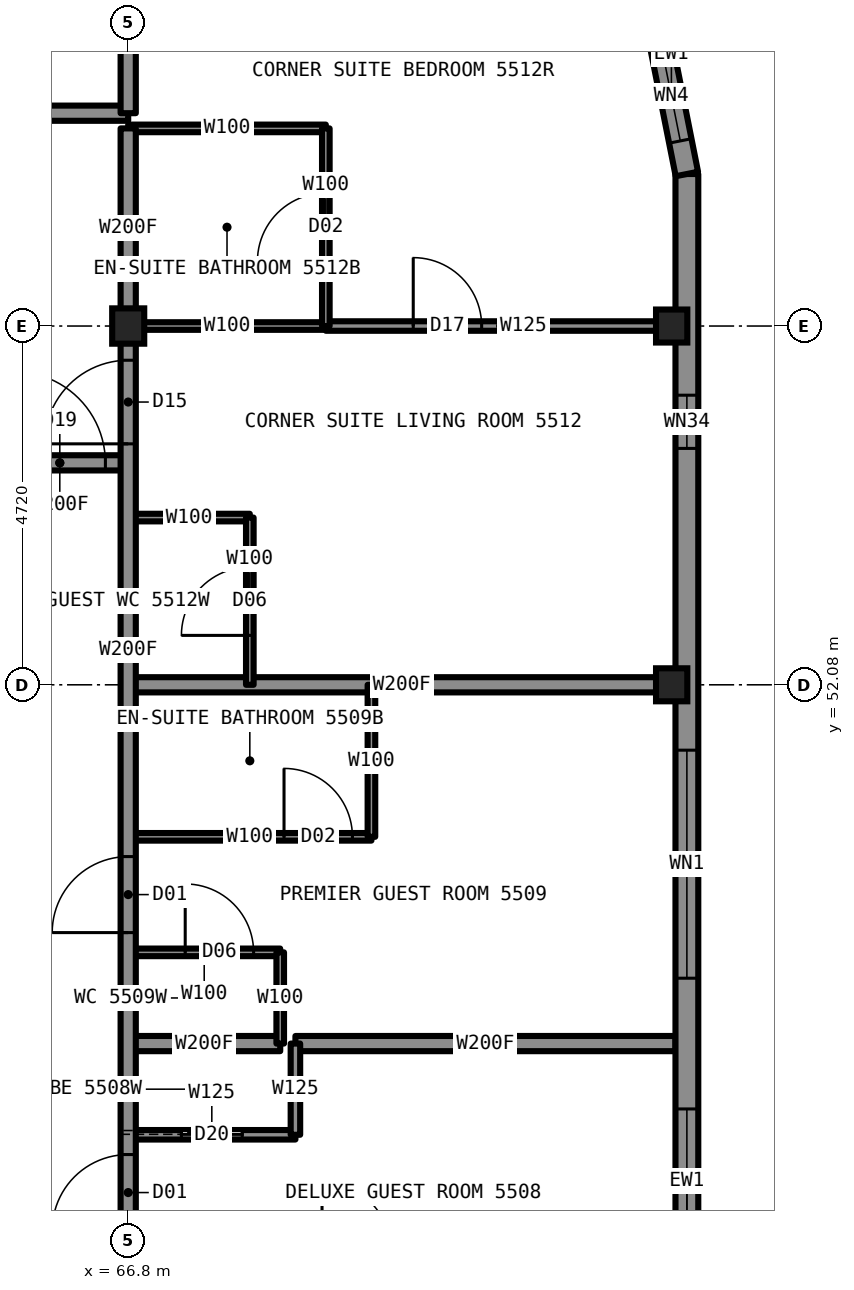
"""IFC4 building model, lengths in metres.
Left out: names, types, materials, properties, quantities, classifications, styles, units other than length and angle.
Written with IfcOpenShell. Run it as: python <this file> out.ifc"""

import sys

from ifc_helpers import new_model, si_unit, direction, frame, frame_2d, origin, origin_2d, place, context, subcontext, project, spatial, rectangle, i_section, extrude, element, fill, save


model = new_model("IFC4")
c1 = context("Model", 3, precision=1e-05, world=origin(), true_north=direction((0.0, 1.0)))
c2 = subcontext(c1, "Body", "Model", "MODEL_VIEW")
j1 = project(units=[si_unit("LENGTHUNIT", "METRE"), si_unit("PLANEANGLEUNIT", "RADIAN")], contexts=[c1])
p1 = place(None, origin())
s1 = spatial("IfcSite", under=j1, at=p1, CompositionType="ELEMENT")
p2 = place(p1, origin())
s2 = spatial("IfcBuilding", under=s1, at=p2, CompositionType="ELEMENT")
p3 = place(p2, frame((0.0, 0.0, 203.8)))
s3 = spatial("IfcBuildingStorey", under=s2, at=p3, CompositionType="ELEMENT", Elevation=203.8)
for number, where, z_axis, x_axis in (
    (1, (73.95, 52.08, 0.0), (0.0, 0.0, 1.0), (1.0, 0.0, 0.0)),
    (2, (73.95, 56.8, 0.0), (0.0, 0.0, 1.0), (1.0, 0.0, 0.0)),
):
    element("IfcColumn", number, at=place(p3, frame(where, z_axis=z_axis, x_axis=x_axis)), inside=s3, PredefinedType="COLUMN", context=c2, shape_type="SweptSolid", body=[
        extrude(i_section(OverallWidth=0.411, OverallDepth=0.434, WebThickness=0.036, FlangeThickness=0.057, at=origin_2d()), origin(), (0.0, 0.0, 1.0), 3.5),
    ])
p4 = place(p3, frame((66.8, 56.8, 0.0), z_axis=(0.0, 0.0, 1.0), x_axis=(1.0, 0.0, 0.0)))
e3 = element("IfcColumn", 3, at=p4, inside=s3, PredefinedType="COLUMN", context=c2, shape_type="SweptSolid", body=[
    extrude(i_section(OverallWidth=0.422, OverallDepth=0.465, WebThickness=0.045, FlangeThickness=0.073, at=origin_2d()), origin(), (0.0, 0.0, 1.0), 3.5),
])
p5 = place(p3, frame((66.8, 46.16, 0.0), z_axis=(0.0, 0.0, 1.0), x_axis=(1.0, 0.0, 0.0)))
e4 = element("IfcWall", 4, at=p5, inside=s3, PredefinedType="PARTITIONING", context=c2, shape_type="SweptSolid", body=[
    extrude(rectangle(XDim=2.2, YDim=0.125, at=frame_2d((1.1, 0.0))), origin(), (0.0, 0.0, 1.0), 3.33),
])
p6 = place(p5, frame((0.7, 0.0, 0.0)))
e5 = element("IfcOpeningElement", 5, at=p6, cuts=e4, PredefinedType="OPENING", context=c2, shape_type="SweptSolid", body=[
    extrude(rectangle(XDim=0.8, YDim=2.1, at=frame_2d((0.4, 1.05))), frame((0.0, 0.073, 0.0), z_axis=(0.0, -1.0, 0.0), x_axis=(1.0, 0.0, 0.0)), (0.0, 0.0, 1.0), 0.145),
])
p7 = place(p3, frame((65.0, 55.0, 0.0), z_axis=(0.0, 0.0, 1.0), x_axis=(1.0, 0.0, 0.0)))
e6 = element("IfcWall", 6, at=p7, inside=s3, PredefinedType="PARTITIONING", context=c2, shape_type="SweptSolid", body=[
    extrude(rectangle(XDim=1.8, YDim=0.2, at=frame_2d((0.9, 0.0))), origin(), (0.0, 0.0, 1.0), 3.33),
])
p8 = place(p7, frame((0.3, 0.0, 0.0)))
e7 = element("IfcOpeningElement", 7, at=p8, cuts=e6, PredefinedType="OPENING", context=c2, shape_type="SweptSolid", body=[
    extrude(rectangle(XDim=1.2, YDim=2.2, at=frame_2d((0.6, 1.1))), frame((0.0, 0.11, 0.0), z_axis=(0.0, -1.0, 0.0), x_axis=(1.0, 0.0, 0.0)), (0.0, 0.0, 1.0), 0.22),
])
p9 = place(p3, frame((66.8, 56.8, 0.0), z_axis=(0.0, 0.0, 1.0), x_axis=(1.0, 0.0, 0.0)))
e8 = element("IfcWall", 8, at=p9, inside=s3, PredefinedType="PARTITIONING", context=c2, shape_type="SweptSolid", body=[
    extrude(rectangle(XDim=2.6, YDim=0.1, at=frame_2d((1.3, 0.0))), origin(), (0.0, 0.0, 1.0), 2.573),
])
p10 = place(p3, frame((69.4, 56.8, 0.0), z_axis=(0.0, 0.0, 1.0), x_axis=(1.0, 0.0, 0.0)))
e9 = element("IfcWall", 9, at=p10, inside=s3, PredefinedType="PARTITIONING", context=c2, shape_type="SweptSolid", body=[
    extrude(rectangle(XDim=4.6, YDim=0.125, at=frame_2d((2.3, 0.0))), origin(), (0.0, 0.0, 1.0), 2.573),
])
p11 = place(p10, frame((1.15, 0.0, 0.0)))
e10 = element("IfcOpeningElement", 10, at=p11, cuts=e9, PredefinedType="OPENING", context=c2, shape_type="SweptSolid", body=[
    extrude(rectangle(XDim=0.9, YDim=2.2, at=frame_2d((0.45, 1.1))), frame((0.0, 0.073, 0.0), z_axis=(0.0, -1.0, 0.0), x_axis=(1.0, 0.0, 0.0)), (0.0, 0.0, 1.0), 0.145),
])
p12 = place(p3, frame((66.8, 59.4, 0.0), z_axis=(0.0, 0.0, 1.0), x_axis=(1.0, 0.0, 0.0)))
e11 = element("IfcWall", 11, at=p12, inside=s3, PredefinedType="PARTITIONING", context=c2, shape_type="SweptSolid", body=[
    extrude(rectangle(XDim=2.6, YDim=0.1, at=frame_2d((1.3, 0.0))), origin(), (0.0, 0.0, 1.0), 3.33),
])
p13 = place(p3, frame((43.2, 59.6, 0.0), z_axis=(0.0, 0.0, 1.0), x_axis=(1.0, 0.0, 0.0)))
e12 = element("IfcWall", 12, at=p13, inside=s3, PredefinedType="PARTITIONING", context=c2, shape_type="SweptSolid", body=[
    extrude(rectangle(XDim=23.6, YDim=0.2, at=frame_2d((11.8, 0.0))), origin(), (0.0, 0.0, 1.0), 3.33),
])
p14 = place(p13, frame((1.46, 0.0, 0.0)))
e13 = element("IfcOpeningElement", 13, at=p14, cuts=e12, PredefinedType="OPENING", context=c2, shape_type="SweptSolid", body=[
    extrude(rectangle(XDim=1.0, YDim=2.2, at=frame_2d((0.5, 1.1))), frame((0.0, 0.11, 0.0), z_axis=(0.0, -1.0, 0.0), x_axis=(1.0, 0.0, 0.0)), (0.0, 0.0, 1.0), 0.22),
])
p15 = place(p13, frame((6.18, 0.0, 0.0)))
e14 = element("IfcOpeningElement", 14, at=p15, cuts=e12, PredefinedType="OPENING", context=c2, shape_type="SweptSolid", body=[
    extrude(rectangle(XDim=1.0, YDim=2.2, at=frame_2d((0.5, 1.1))), frame((0.0, 0.11, 0.0), z_axis=(0.0, -1.0, 0.0), x_axis=(1.0, 0.0, 0.0)), (0.0, 0.0, 1.0), 0.22),
])
p16 = place(p13, frame((11.29, 0.0, 0.0)))
e15 = element("IfcOpeningElement", 15, at=p16, cuts=e12, PredefinedType="OPENING", context=c2, shape_type="SweptSolid", body=[
    extrude(rectangle(XDim=1.1, YDim=2.2, at=frame_2d((0.55, 1.1))), frame((0.0, 0.11, 0.0), z_axis=(0.0, -1.0, 0.0), x_axis=(1.0, 0.0, 0.0)), (0.0, 0.0, 1.0), 0.22),
])
p17 = place(p3, frame((66.8, 47.36, 0.0), z_axis=(0.0, 0.0, 1.0), x_axis=(1.0, 0.0, 0.0)))
e16 = element("IfcWall", 16, at=p17, inside=s3, PredefinedType="PARTITIONING", context=c2, shape_type="SweptSolid", body=[
    extrude(rectangle(XDim=2.0, YDim=0.2, at=frame_2d((1.0, 0.0))), origin(), (0.0, 0.0, 1.0), 2.73),
])
p18 = place(p3, frame((69.0, 47.36, 0.0), z_axis=(0.0, 0.0, 1.0), x_axis=(1.0, 0.0, 0.0)))
e17 = element("IfcWall", 17, at=p18, inside=s3, PredefinedType="PARTITIONING", context=c2, shape_type="SweptSolid", body=[
    extrude(rectangle(XDim=5.0, YDim=0.2, at=frame_2d((2.5, 0.0))), origin(), (0.0, 0.0, 1.0), 2.73),
])
p19 = place(p3, frame((66.8, 48.56, 0.0), z_axis=(0.0, 0.0, 1.0), x_axis=(1.0, 0.0, 0.0)))
e18 = element("IfcWall", 18, at=p19, inside=s3, PredefinedType="PARTITIONING", context=c2, shape_type="SweptSolid", body=[
    extrude(rectangle(XDim=2.0, YDim=0.1, at=frame_2d((1.0, 0.0))), origin(), (0.0, 0.0, 1.0), 3.33),
])
p20 = place(p19, frame((0.75, 0.0, 0.0)))
e19 = element("IfcOpeningElement", 19, at=p20, cuts=e18, PredefinedType="OPENING", context=c2, shape_type="SweptSolid", body=[
    extrude(rectangle(XDim=0.9, YDim=2.1, at=frame_2d((0.45, 1.05))), frame((0.0, 0.06, 0.0), z_axis=(0.0, -1.0, 0.0), x_axis=(1.0, 0.0, 0.0)), (0.0, 0.0, 1.0), 0.12),
])
p21 = place(p3, frame((66.8, 50.08, 0.0), z_axis=(0.0, 0.0, 1.0), x_axis=(1.0, 0.0, 0.0)))
e20 = element("IfcWall", 20, at=p21, inside=s3, PredefinedType="PARTITIONING", context=c2, shape_type="SweptSolid", body=[
    extrude(rectangle(XDim=3.2, YDim=0.1, at=frame_2d((1.6, 0.0))), origin(), (0.0, 0.0, 1.0), 3.33),
])
p22 = place(p21, frame((2.05, 0.0, 0.0)))
e21 = element("IfcOpeningElement", 21, at=p22, cuts=e20, PredefinedType="OPENING", context=c2, shape_type="SweptSolid", body=[
    extrude(rectangle(XDim=0.9, YDim=2.1, at=frame_2d((0.45, 1.05))), frame((0.0, 0.06, 0.0), z_axis=(0.0, -1.0, 0.0), x_axis=(1.0, 0.0, 0.0)), (0.0, 0.0, 1.0), 0.12),
])
p23 = place(p3, frame((66.8, 52.08, 0.0), z_axis=(0.0, 0.0, 1.0), x_axis=(1.0, 0.0, 0.0)))
e22 = element("IfcWall", 22, at=p23, inside=s3, PredefinedType="PARTITIONING", context=c2, shape_type="SweptSolid", body=[
    extrude(rectangle(XDim=7.2, YDim=0.2, at=frame_2d((3.6, 0.0))), origin(), (0.0, 0.0, 1.0), 2.573),
])
p24 = place(p3, frame((66.8, 54.28, 0.0), z_axis=(0.0, 0.0, 1.0), x_axis=(1.0, 0.0, 0.0)))
e23 = element("IfcWall", 23, at=p24, inside=s3, PredefinedType="PARTITIONING", context=c2, shape_type="SweptSolid", body=[
    extrude(rectangle(XDim=1.6, YDim=0.1, at=frame_2d((0.8, 0.0))), origin(), (0.0, 0.0, 1.0), 3.33),
])
p25 = place(p3, frame((66.8, 33.2, 0.0), z_axis=(0.0, 0.0, 1.0), x_axis=(0.0, 1.0, 0.0)))
e24 = element("IfcWall", 24, at=p25, inside=s3, PredefinedType="PARTITIONING", context=c2, shape_type="SweptSolid", body=[
    extrude(rectangle(XDim=23.58, YDim=0.2, at=frame_2d((11.79, 0.0))), origin(), (0.0, 0.0, 1.0), 3.33),
])
p26 = place(p25, frame((6.98, 0.0, 0.0)))
e25 = element("IfcOpeningElement", 25, at=p26, cuts=e24, PredefinedType="OPENING", context=c2, shape_type="SweptSolid", body=[
    extrude(rectangle(XDim=1.0, YDim=2.2, at=frame_2d((0.5, 1.1))), frame((0.0, 0.11, 0.0), z_axis=(0.0, -1.0, 0.0), x_axis=(1.0, 0.0, 0.0)), (0.0, 0.0, 1.0), 0.22),
])
p27 = place(p25, frame((11.7, 0.0, 0.0)))
e26 = element("IfcOpeningElement", 26, at=p27, cuts=e24, PredefinedType="OPENING", context=c2, shape_type="SweptSolid", body=[
    extrude(rectangle(XDim=1.0, YDim=2.2, at=frame_2d((0.5, 1.1))), frame((0.0, 0.11, 0.0), z_axis=(0.0, -1.0, 0.0), x_axis=(1.0, 0.0, 0.0)), (0.0, 0.0, 1.0), 0.22),
])
p28 = place(p25, frame((15.62, 0.0, 0.0)))
e27 = element("IfcOpeningElement", 27, at=p28, cuts=e24, PredefinedType="OPENING", context=c2, shape_type="SweptSolid", body=[
    extrude(rectangle(XDim=1.0, YDim=2.2, at=frame_2d((0.5, 1.1))), frame((0.0, 0.11, 0.0), z_axis=(0.0, -1.0, 0.0), x_axis=(1.0, 0.0, 0.0)), (0.0, 0.0, 1.0), 0.22),
])
p29 = place(p25, frame((22.05, 0.0, 0.0)))
e28 = element("IfcOpeningElement", 28, at=p29, cuts=e24, PredefinedType="OPENING", context=c2, shape_type="SweptSolid", body=[
    extrude(rectangle(XDim=1.1, YDim=2.2, at=frame_2d((0.55, 1.1))), frame((0.0, 0.11, 0.0), z_axis=(0.0, -1.0, 0.0), x_axis=(1.0, 0.0, 0.0)), (0.0, 0.0, 1.0), 0.22),
])
p30 = place(p25, frame((0.65, 0.0, 0.0)))
e29 = element("IfcOpeningElement", 29, at=p30, cuts=e24, PredefinedType="OPENING", context=c2, shape_type="SweptSolid", body=[
    extrude(rectangle(XDim=1.1, YDim=2.2, at=frame_2d((0.55, 1.1))), frame((0.0, 0.11, 0.0), z_axis=(0.0, -1.0, 0.0), x_axis=(1.0, 0.0, 0.0)), (0.0, 0.0, 1.0), 0.22),
])
p31 = place(p3, frame((66.8, 59.6, 0.0), z_axis=(0.0, 0.0, 1.0), x_axis=(0.0, 1.0, 0.0)))
e30 = element("IfcWall", 30, at=p31, inside=s3, PredefinedType="PARTITIONING", context=c2, shape_type="SweptSolid", body=[
    extrude(rectangle(XDim=4.4, YDim=0.2, at=frame_2d((2.2, 0.0))), origin(), (0.0, 0.0, 1.0), 2.573),
])
p32 = place(p3, frame((68.4, 52.08, 0.0), z_axis=(0.0, 0.0, 1.0), x_axis=(0.0, 1.0, 0.0)))
e31 = element("IfcWall", 31, at=p32, inside=s3, PredefinedType="PARTITIONING", context=c2, shape_type="SweptSolid", body=[
    extrude(rectangle(XDim=2.2, YDim=0.1, at=frame_2d((1.1, 0.0))), origin(), (0.0, 0.0, 1.0), 3.33),
])
p33 = place(p32, frame((0.65, 0.0, 0.0)))
e32 = element("IfcOpeningElement", 32, at=p33, cuts=e31, PredefinedType="OPENING", context=c2, shape_type="SweptSolid", body=[
    extrude(rectangle(XDim=0.9, YDim=2.1, at=frame_2d((0.45, 1.05))), frame((0.0, 0.06, 0.0), z_axis=(0.0, -1.0, 0.0), x_axis=(1.0, 0.0, 0.0)), (0.0, 0.0, 1.0), 0.12),
])
p34 = place(p3, frame((68.8, 47.36, 0.0), z_axis=(0.0, 0.0, 1.0), x_axis=(0.0, 1.0, 0.0)))
e33 = element("IfcWall", 33, at=p34, inside=s3, PredefinedType="PARTITIONING", context=c2, shape_type="SweptSolid", body=[
    extrude(rectangle(XDim=1.2, YDim=0.1, at=frame_2d((0.6, 0.0))), origin(), (0.0, 0.0, 1.0), 3.33),
])
p35 = place(p3, frame((69.0, 46.16, 0.0), z_axis=(0.0, 0.0, 1.0), x_axis=(0.0, 1.0, 0.0)))
e34 = element("IfcWall", 34, at=p35, inside=s3, PredefinedType="PARTITIONING", context=c2, shape_type="SweptSolid", body=[
    extrude(rectangle(XDim=1.2, YDim=0.125, at=frame_2d((0.6, 0.0))), origin(), (0.0, 0.0, 1.0), 3.33),
])
p36 = place(p3, frame((69.4, 56.8, 0.0), z_axis=(0.0, 0.0, 1.0), x_axis=(0.0, 1.0, 0.0)))
e35 = element("IfcWall", 35, at=p36, inside=s3, PredefinedType="PARTITIONING", context=c2, shape_type="SweptSolid", body=[
    extrude(rectangle(XDim=2.6, YDim=0.1, at=frame_2d((1.3, 0.0))), origin(), (0.0, 0.0, 1.0), 3.33),
])
p37 = place(p36, frame((0.85, 0.0, 0.0)))
e36 = element("IfcOpeningElement", 36, at=p37, cuts=e35, PredefinedType="OPENING", context=c2, shape_type="SweptSolid", body=[
    extrude(rectangle(XDim=0.9, YDim=2.1, at=frame_2d((0.45, 1.05))), frame((0.0, 0.06, 0.0), z_axis=(0.0, -1.0, 0.0), x_axis=(1.0, 0.0, 0.0)), (0.0, 0.0, 1.0), 0.12),
])
p38 = place(p3, frame((70.0, 50.08, 0.0), z_axis=(0.0, 0.0, 1.0), x_axis=(0.0, 1.0, 0.0)))
e37 = element("IfcWall", 37, at=p38, inside=s3, PredefinedType="PARTITIONING", context=c2, shape_type="SweptSolid", body=[
    extrude(rectangle(XDim=2.0, YDim=0.1, at=frame_2d((1.0, 0.0))), origin(), (0.0, 0.0, 1.0), 3.33),
])
p39 = place(p3, frame((74.15, 31.2, 0.0), z_axis=(0.0, 0.0, 1.0), x_axis=(0.0, 1.0, 0.0)))
e38 = element("IfcWall", 38, at=p39, inside=s3, PredefinedType="SOLIDWALL", context=c2, shape_type="SweptSolid", body=[
    extrude(rectangle(XDim=27.6, YDim=0.3, at=frame_2d((13.8, 0.0))), origin(), (0.0, 0.0, 1.0), 2.83),
])
p40 = place(p39, frame((2.86, 0.0, 0.3)))
e39 = element("IfcOpeningElement", 39, at=p40, cuts=e38, PredefinedType="OPENING", context=c2, shape_type="SweptSolid", body=[
    extrude(rectangle(XDim=0.7, YDim=1.2, at=frame_2d((0.35, 0.6))), frame((0.0, 0.16, 0.0), z_axis=(0.0, -1.0, 0.0), x_axis=(1.0, 0.0, 0.0)), (0.0, 0.0, 1.0), 0.32),
])
p41 = place(p39, frame((7.58, 0.0, 0.3)))
e40 = element("IfcOpeningElement", 40, at=p41, cuts=e38, PredefinedType="OPENING", context=c2, shape_type="SweptSolid", body=[
    extrude(rectangle(XDim=3.0, YDim=2.0, at=frame_2d((1.5, 1.0))), frame((0.0, 0.16, 0.0), z_axis=(0.0, -1.0, 0.0), x_axis=(1.0, 0.0, 0.0)), (0.0, 0.0, 1.0), 0.32),
])
p42 = place(p39, frame((12.3, 0.0, 0.3)))
e41 = element("IfcOpeningElement", 41, at=p42, cuts=e38, PredefinedType="OPENING", context=c2, shape_type="SweptSolid", body=[
    extrude(rectangle(XDim=3.0, YDim=2.0, at=frame_2d((1.5, 1.0))), frame((0.0, 0.16, 0.0), z_axis=(0.0, -1.0, 0.0), x_axis=(1.0, 0.0, 0.0)), (0.0, 0.0, 1.0), 0.32),
])
p43 = place(p39, frame((17.02, 0.0, 0.3)))
e42 = element("IfcOpeningElement", 42, at=p43, cuts=e38, PredefinedType="OPENING", context=c2, shape_type="SweptSolid", body=[
    extrude(rectangle(XDim=3.0, YDim=2.0, at=frame_2d((1.5, 1.0))), frame((0.0, 0.16, 0.0), z_axis=(0.0, -1.0, 0.0), x_axis=(1.0, 0.0, 0.0)), (0.0, 0.0, 1.0), 0.32),
])
p44 = place(p39, frame((23.99, 0.0, 0.3)))
e43 = element("IfcOpeningElement", 43, at=p44, cuts=e38, PredefinedType="OPENING", context=c2, shape_type="SweptSolid", body=[
    extrude(rectangle(XDim=0.7, YDim=1.2, at=frame_2d((0.35, 0.6))), frame((0.0, 0.16, 0.0), z_axis=(0.0, -1.0, 0.0), x_axis=(1.0, 0.0, 0.0)), (0.0, 0.0, 1.0), 0.32),
])
p45 = place(p3, frame((74.15, 58.8, 0.0), z_axis=(0.0, 0.0, 1.0), x_axis=(-0.195081421501, 0.980787050784, 0.0)))
e44 = element("IfcWall", 44, at=p45, inside=s3, PredefinedType="SOLIDWALL", context=c2, shape_type="SweptSolid", body=[
    extrude(rectangle(XDim=2.087, YDim=0.3, at=frame_2d((1.044, 0.0))), origin(), (0.0, 0.0, 1.0), 3.33),
])
p46 = place(p45, frame((0.444, 0.0, 0.3)))
e45 = element("IfcOpeningElement", 45, at=p46, cuts=e44, PredefinedType="OPENING", context=c2, shape_type="SweptSolid", body=[
    extrude(rectangle(XDim=1.2, YDim=2.0, at=frame_2d((0.6, 1.0))), frame((0.0, 0.16, 0.0), z_axis=(0.0, -1.0, 0.0), x_axis=(1.0, 0.0, 0.0)), (0.0, 0.0, 1.0), 0.32),
])
p47 = place(p3, frame((66.8, 56.78, 0.0), z_axis=(0.0, 0.0, 1.0), x_axis=(0.0, 1.0, 0.0)))
e46 = element("IfcWall", 46, at=p47, inside=s3, PredefinedType="PARTITIONING", context=c2, shape_type="SweptSolid", body=[
    extrude(rectangle(XDim=2.62, YDim=0.2, at=frame_2d((1.31, 0.0))), origin(), (0.0, 0.0, 1.0), 2.573),
])
p48 = place(p8, origin())
e47 = element("IfcDoor", 47, at=p48, inside=s3, OperationType="SINGLE_SWING_LEFT", PredefinedType="DOOR", context=c2, shape_type="SweptSolid", body=[
    extrude(rectangle(XDim=1.2, YDim=2.2, at=frame_2d((0.6, 1.1))), frame((0.0, 0.025, 0.0), z_axis=(0.0, -1.0, 0.0), x_axis=(1.0, 0.0, 0.0)), (0.0, 0.0, 1.0), 0.05),
])
fill(e7, e47)
p49 = place(p27, origin())
e48 = element("IfcDoor", 48, at=p49, inside=s3, OperationType="SINGLE_SWING_LEFT", PredefinedType="DOOR", context=c2, shape_type="SweptSolid", body=[
    extrude(rectangle(XDim=1.0, YDim=2.2, at=frame_2d((0.5, 1.1))), frame((0.0, 0.025, 0.0), z_axis=(0.0, -1.0, 0.0), x_axis=(1.0, 0.0, 0.0)), (0.0, 0.0, 1.0), 0.05),
])
fill(e26, e48)
p50 = place(p6, origin())
e49 = element("IfcDoor", 49, at=p50, inside=s3, OperationType="SLIDING_TO_LEFT", PredefinedType="DOOR", context=c2, shape_type="SweptSolid", body=[
    extrude(rectangle(XDim=0.8, YDim=2.1, at=frame_2d((0.4, 1.05))), frame((0.0, 0.025, 0.0), z_axis=(0.0, -1.0, 0.0), x_axis=(1.0, 0.0, 0.0)), (0.0, 0.0, 1.0), 0.05),
])
fill(e5, e49)
p51 = place(p28, origin())
e50 = element("IfcDoor", 50, at=p51, inside=s3, OperationType="SINGLE_SWING_LEFT", PredefinedType="DOOR", context=c2, shape_type="SweptSolid", body=[
    extrude(rectangle(XDim=1.0, YDim=2.2, at=frame_2d((0.5, 1.1))), frame((0.0, 0.025, 0.0), z_axis=(0.0, -1.0, 0.0), x_axis=(1.0, 0.0, 0.0)), (0.0, 0.0, 1.0), 0.05),
])
fill(e27, e50)
p52 = place(p22, origin())
e51 = element("IfcDoor", 51, at=p52, inside=s3, OperationType="SINGLE_SWING_RIGHT", PredefinedType="DOOR", context=c2, shape_type="SweptSolid", body=[
    extrude(rectangle(XDim=0.9, YDim=2.1, at=frame_2d((0.45, 1.05))), frame((0.0, 0.025, 0.0), z_axis=(0.0, -1.0, 0.0), x_axis=(1.0, 0.0, 0.0)), (0.0, 0.0, 1.0), 0.05),
])
fill(e21, e51)
p53 = place(p20, origin())
e52 = element("IfcDoor", 52, at=p53, inside=s3, OperationType="SINGLE_SWING_LEFT", PredefinedType="DOOR", context=c2, shape_type="SweptSolid", body=[
    extrude(rectangle(XDim=0.9, YDim=2.1, at=frame_2d((0.45, 1.05))), frame((0.0, 0.025, 0.0), z_axis=(0.0, -1.0, 0.0), x_axis=(1.0, 0.0, 0.0)), (0.0, 0.0, 1.0), 0.05),
])
fill(e19, e52)
p54 = place(p29, origin())
e53 = element("IfcDoor", 53, at=p54, inside=s3, OperationType="SINGLE_SWING_LEFT", PredefinedType="DOOR", context=c2, shape_type="SweptSolid", body=[
    extrude(rectangle(XDim=1.1, YDim=2.2, at=frame_2d((0.55, 1.1))), frame((0.0, 0.025, 0.0), z_axis=(0.0, -1.0, 0.0), x_axis=(1.0, 0.0, 0.0)), (0.0, 0.0, 1.0), 0.05),
])
fill(e28, e53)
p55 = place(p37, origin())
e54 = element("IfcDoor", 54, at=p55, inside=s3, OperationType="SINGLE_SWING_RIGHT", PredefinedType="DOOR", context=c2, shape_type="SweptSolid", body=[
    extrude(rectangle(XDim=0.9, YDim=2.1, at=frame_2d((0.45, 1.05))), frame((0.0, 0.025, 0.0), z_axis=(0.0, -1.0, 0.0), x_axis=(1.0, 0.0, 0.0)), (0.0, 0.0, 1.0), 0.05),
])
fill(e36, e54)
p56 = place(p11, origin())
e55 = element("IfcDoor", 55, at=p56, inside=s3, OperationType="SINGLE_SWING_LEFT", PredefinedType="DOOR", context=c2, shape_type="SweptSolid", body=[
    extrude(rectangle(XDim=0.9, YDim=2.2, at=frame_2d((0.45, 1.1))), frame((0.0, 0.025, 0.0), z_axis=(0.0, -1.0, 0.0), x_axis=(1.0, 0.0, 0.0)), (0.0, 0.0, 1.0), 0.05),
])
fill(e10, e55)
p57 = place(p33, origin())
e56 = element("IfcDoor", 56, at=p57, inside=s3, OperationType="SINGLE_SWING_LEFT", PredefinedType="DOOR", context=c2, shape_type="SweptSolid", body=[
    extrude(rectangle(XDim=0.9, YDim=2.1, at=frame_2d((0.45, 1.05))), frame((0.0, 0.025, 0.0), z_axis=(0.0, -1.0, 0.0), x_axis=(1.0, 0.0, 0.0)), (0.0, 0.0, 1.0), 0.05),
])
fill(e32, e56)
p58 = place(p42, origin())
e57 = element("IfcWindow", 57, at=p58, inside=s3, PartitioningType="SINGLE_PANEL", PredefinedType="WINDOW", context=c2, shape_type="SweptSolid", body=[
    extrude(rectangle(XDim=3.0, YDim=2.0, at=frame_2d((1.5, 1.0))), frame((0.0, 0.13, 0.0), z_axis=(0.0, -1.0, 0.0), x_axis=(1.0, 0.0, 0.0)), (0.0, 0.0, 1.0), 0.06),
])
fill(e41, e57)
p59 = place(p43, origin())
e58 = element("IfcWindow", 58, at=p59, inside=s3, PartitioningType="SINGLE_PANEL", PredefinedType="WINDOW", context=c2, shape_type="SweptSolid", body=[
    extrude(rectangle(XDim=3.0, YDim=2.0, at=frame_2d((1.5, 1.0))), frame((0.0, 0.13, 0.0), z_axis=(0.0, -1.0, 0.0), x_axis=(1.0, 0.0, 0.0)), (0.0, 0.0, 1.0), 0.06),
])
fill(e42, e58)
p60 = place(p44, origin())
e59 = element("IfcWindow", 59, at=p60, inside=s3, PartitioningType="SINGLE_PANEL", PredefinedType="WINDOW", context=c2, shape_type="SweptSolid", body=[
    extrude(rectangle(XDim=0.7, YDim=1.2, at=frame_2d((0.35, 0.6))), frame((0.0, 0.13, 0.0), z_axis=(0.0, -1.0, 0.0), x_axis=(1.0, 0.0, 0.0)), (0.0, 0.0, 1.0), 0.06),
])
fill(e43, e59)
p61 = place(p46, origin())
e60 = element("IfcWindow", 60, at=p61, inside=s3, PartitioningType="SINGLE_PANEL", PredefinedType="WINDOW", context=c2, shape_type="SweptSolid", body=[
    extrude(rectangle(XDim=1.2, YDim=2.0, at=frame_2d((0.6, 1.0))), frame((0.0, 0.13, 0.0), z_axis=(0.0, -1.0, 0.0), x_axis=(1.0, 0.0, 0.0)), (0.0, 0.0, 1.0), 0.06),
])
fill(e45, e60)
save(model, sys.argv[1])
